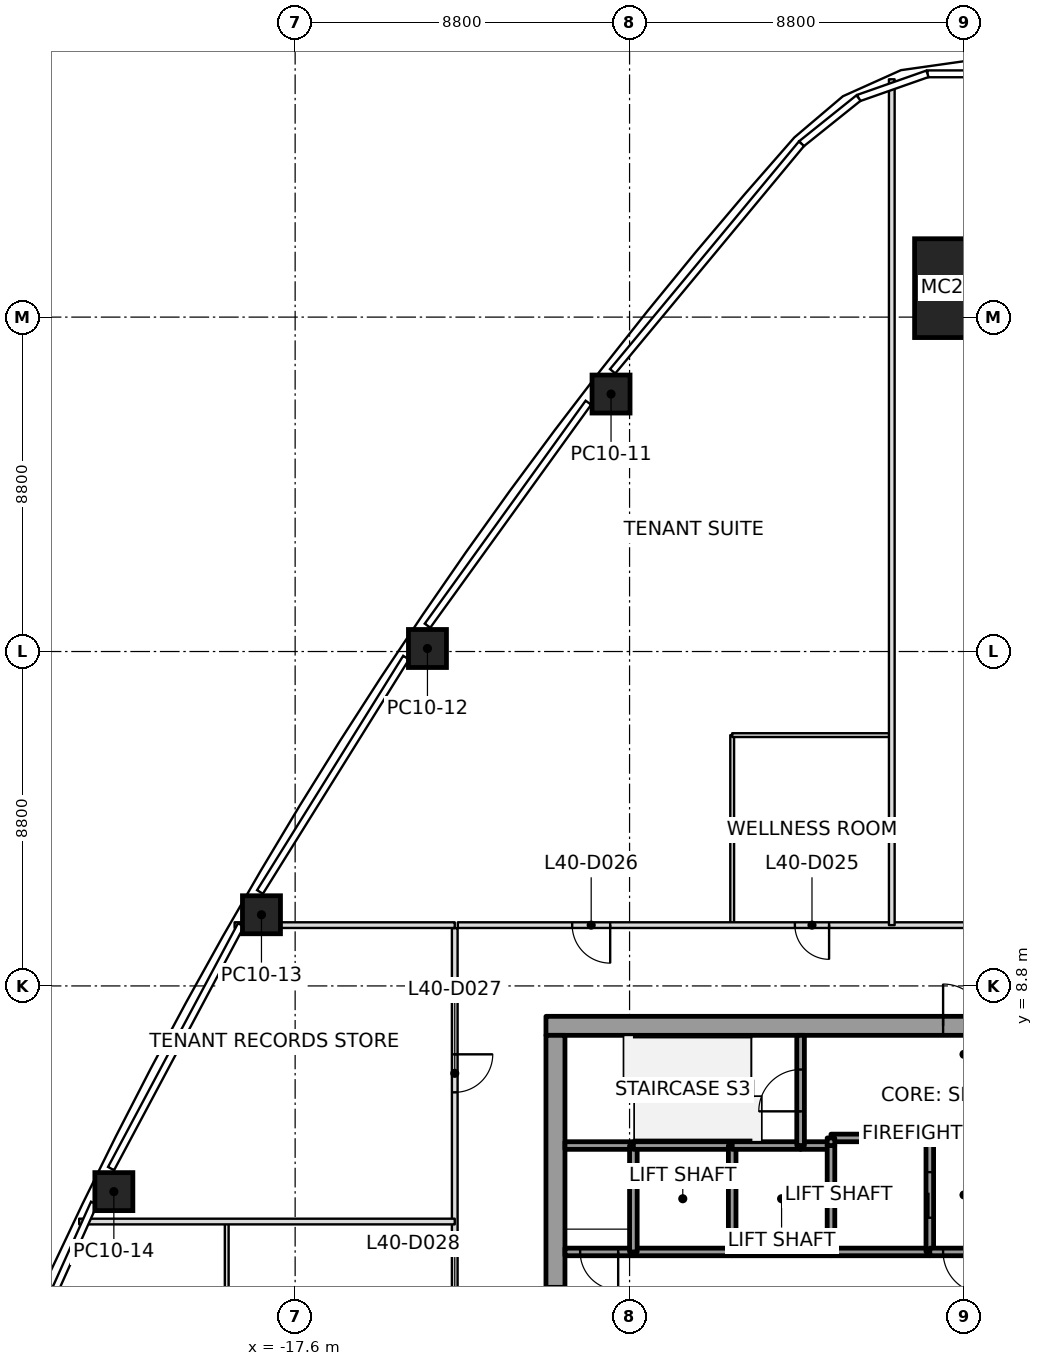
"""IFC4 building model, lengths in metres.
Left out: names, types, materials, properties, quantities, classifications, styles, units other than length and angle.
Written with IfcOpenShell. Run it as: python <this file> out.ifc"""

import sys

from ifc_helpers import new_model, si_unit, direction, frame, frame_2d, origin, origin_2d, place, context, subcontext, project, spatial, rectangle, extrude, element, fill, save


model = new_model("IFC4")
c1 = context("Model", 3, precision=1e-05, world=origin(), true_north=direction((0.0, 1.0)))
c2 = subcontext(c1, "Body", "Model", "MODEL_VIEW")
j1 = project(units=[si_unit("LENGTHUNIT", "METRE"), si_unit("PLANEANGLEUNIT", "RADIAN")], contexts=[c1])
p1 = place(None, origin())
s1 = spatial("IfcSite", under=j1, at=p1, CompositionType="ELEMENT")
p2 = place(p1, origin())
s2 = spatial("IfcBuilding", under=s1, at=p2, CompositionType="ELEMENT")
p3 = place(p2, frame((0.0, 0.0, 181.8)))
s3 = spatial("IfcBuildingStorey", under=s2, at=p3, CompositionType="ELEMENT", Elevation=181.8)
p4 = place(p3, frame((0.0, 27.162, 0.0), z_axis=(0.0, -0.032331720729, 0.999477193254), x_axis=(1.0, 0.0, 0.0)))
e1 = element("IfcColumn", 1, at=p4, inside=s3, PredefinedType="COLUMN", context=c2, shape_type="SweptSolid", body=[
    extrude(rectangle(XDim=2.6, YDim=2.6, at=origin_2d()), origin(), (0.0, 0.0, 1.0), 4.002),
])
p5 = place(p3, frame((-9.288, 24.375, 0.0), z_axis=(0.000244089295, -0.02050350076, 0.999789751336), x_axis=(0.612160679672, 0.790570217655, 0.016063412501)))
e2 = element("IfcColumn", 2, at=p5, inside=s3, PredefinedType="COLUMN", context=c2, shape_type="SweptSolid", body=[
    extrude(rectangle(XDim=1.0, YDim=1.0, at=origin_2d()), origin(), (0.0, 0.0, 1.0), 4.001),
])
p6 = place(p3, frame((-14.118, 17.68, 0.0), z_axis=(0.005248490815, -0.013243284963, 0.999898529226), x_axis=(0.55734623632, 0.83024095087, 0.00807070984)))
e3 = element("IfcColumn", 3, at=p6, inside=s3, PredefinedType="COLUMN", context=c2, shape_type="SweptSolid", body=[
    extrude(rectangle(XDim=1.0, YDim=1.0, at=origin_2d()), origin(), (0.0, 0.0, 1.0), 4.0),
])
p7 = place(p3, frame((-18.486, 10.673, 0.0), z_axis=(0.009887049298, -0.00573692984, 0.999934664812), x_axis=(0.499975560967, 0.866039512843, 2.5126546e-05)))
e4 = element("IfcColumn", 4, at=p7, inside=s3, PredefinedType="COLUMN", context=c2, shape_type="SweptSolid", body=[
    extrude(rectangle(XDim=1.0, YDim=1.0, at=origin_2d()), origin(), (0.0, 0.0, 1.0), 4.0),
])
p8 = place(p3, frame((-22.37, 3.387, 0.0), z_axis=(0.014097691364, 0.002013955909, 0.999898594398), x_axis=(0.440318544462, 0.897805834391, -0.008016429218)))
e5 = element("IfcColumn", 5, at=p8, inside=s3, PredefinedType="COLUMN", context=c2, shape_type="SweptSolid", body=[
    extrude(rectangle(XDim=1.0, YDim=1.0, at=origin_2d()), origin(), (0.0, 0.0, 1.0), 4.0),
])
p9 = place(p3, frame((-11.0, 7.75, 0.0), z_axis=(0.0, 0.0, 1.0), x_axis=(1.0, 0.0, 0.0)))
e6 = element("IfcWall", 6, at=p9, inside=s3, PredefinedType="SHEAR", context=c2, shape_type="SweptSolid", body=[
    extrude(rectangle(XDim=22.0, YDim=0.5, at=frame_2d((11.0, 0.0))), origin(), (0.0, 0.0, 1.0), 4.0),
])
p10 = place(p9, frame((10.45, 0.0, 0.0)))
e7 = element("IfcOpeningElement", 7, at=p10, cuts=e6, PredefinedType="OPENING", context=c2, shape_type="SweptSolid", body=[
    extrude(rectangle(XDim=1.1, YDim=2.1, at=frame_2d((0.55, 1.05))), frame((0.0, 0.25, 0.0), z_axis=(0.0, -1.0, 0.0), x_axis=(1.0, 0.0, 0.0)), (0.0, 0.0, 1.0), 0.5),
])
p11 = place(p3, frame((-10.75, -7.5, 0.0), z_axis=(0.0, 0.0, 1.0), x_axis=(0.0, 1.0, 0.0)))
e8 = element("IfcWall", 8, at=p11, inside=s3, PredefinedType="SHEAR", context=c2, shape_type="SweptSolid", body=[
    extrude(rectangle(XDim=15.0, YDim=0.5, at=frame_2d((7.5, 0.0))), origin(), (0.0, 0.0, 1.0), 4.0),
])
p12 = place(p11, frame((6.6, 0.0, 0.0)))
e9 = element("IfcOpeningElement", 9, at=p12, cuts=e8, PredefinedType="OPENING", context=c2, shape_type="SweptSolid", body=[
    extrude(rectangle(XDim=1.8, YDim=2.1, at=frame_2d((0.9, 1.05))), frame((0.0, 0.25, 0.0), z_axis=(0.0, -1.0, 0.0), x_axis=(1.0, 0.0, 0.0)), (0.0, 0.0, 1.0), 0.5),
])
p13 = place(p3, frame((-8.7, 1.8, 0.0), z_axis=(0.0, 0.0, 1.0), x_axis=(-1.0, 0.0, 0.0)))
e10 = element("IfcWall", 10, at=p13, inside=s3, PredefinedType="SOLIDWALL", context=c2, shape_type="SweptSolid", body=[
    extrude(rectangle(XDim=1.8, YDim=0.2, at=frame_2d((0.9, 0.0))), origin(), (0.0, 0.0, 1.0), 3.85),
])
p14 = place(p13, frame((0.4, 0.0, 0.0)))
e11 = element("IfcOpeningElement", 11, at=p14, cuts=e10, PredefinedType="OPENING", context=c2, shape_type="SweptSolid", body=[
    extrude(rectangle(XDim=1.0, YDim=2.1, at=frame_2d((0.5, 1.05))), frame((0.0, 0.1, 0.0), z_axis=(0.0, -1.0, 0.0), x_axis=(1.0, 0.0, 0.0)), (0.0, 0.0, 1.0), 0.2),
])
p15 = place(p3, frame((-8.7, 4.6, 0.0), z_axis=(0.0, 0.0, 1.0), x_axis=(-1.0, 0.0, 0.0)))
e12 = element("IfcWall", 12, at=p15, inside=s3, PredefinedType="SOLIDWALL", context=c2, shape_type="SweptSolid", body=[
    extrude(rectangle(XDim=1.8, YDim=0.2, at=frame_2d((0.9, 0.0))), origin(), (0.0, 0.0, 1.0), 3.85),
])
p16 = place(p3, frame((-6.1, 1.8, 0.0), z_axis=(0.0, 0.0, 1.0), x_axis=(-1.0, 0.0, 0.0)))
e13 = element("IfcWall", 13, at=p16, inside=s3, PredefinedType="SOLIDWALL", context=c2, shape_type="SweptSolid", body=[
    extrude(rectangle(XDim=2.6, YDim=0.2, at=frame_2d((1.3, 0.0))), origin(), (0.0, 0.0, 1.0), 3.85),
])
p17 = place(p3, frame((-8.7, 1.8, 0.0), z_axis=(0.0, 0.0, 1.0), x_axis=(0.0, 1.0, 0.0)))
e14 = element("IfcWall", 14, at=p17, inside=s3, PredefinedType="SOLIDWALL", context=c2, shape_type="SweptSolid", body=[
    extrude(rectangle(XDim=2.8, YDim=0.2, at=frame_2d((1.4, 0.0))), origin(), (0.0, 0.0, 1.0), 3.85),
])
p18 = place(p3, frame((-6.1, 4.6, 0.0), z_axis=(0.0, 0.0, 1.0), x_axis=(-1.0, 0.0, 0.0)))
e15 = element("IfcWall", 15, at=p18, inside=s3, PredefinedType="SOLIDWALL", context=c2, shape_type="SweptSolid", body=[
    extrude(rectangle(XDim=2.6, YDim=0.2, at=frame_2d((1.3, 0.0))), origin(), (0.0, 0.0, 1.0), 3.85),
])
p19 = place(p3, frame((-3.5, 1.8, 0.0), z_axis=(0.0, 0.0, 1.0), x_axis=(-1.0, 0.0, 0.0)))
e16 = element("IfcWall", 16, at=p19, inside=s3, PredefinedType="SOLIDWALL", context=c2, shape_type="SweptSolid", body=[
    extrude(rectangle(XDim=2.6, YDim=0.2, at=frame_2d((1.3, 0.0))), origin(), (0.0, 0.0, 1.0), 3.85),
])
p20 = place(p3, frame((-6.1, 1.8, 0.0), z_axis=(0.0, 0.0, 1.0), x_axis=(0.0, 1.0, 0.0)))
e17 = element("IfcWall", 17, at=p20, inside=s3, PredefinedType="SOLIDWALL", context=c2, shape_type="SweptSolid", body=[
    extrude(rectangle(XDim=2.8, YDim=0.2, at=frame_2d((1.4, 0.0))), origin(), (0.0, 0.0, 1.0), 3.85),
])
p21 = place(p3, frame((-4.3, 4.6, 0.0), z_axis=(0.0, 0.0, 1.0), x_axis=(-1.0, 0.0, 0.0)))
e18 = element("IfcWall", 18, at=p21, inside=s3, PredefinedType="SOLIDWALL", context=c2, shape_type="SweptSolid", body=[
    extrude(rectangle(XDim=1.8, YDim=0.2, at=frame_2d((0.9, 0.0))), origin(), (0.0, 0.0, 1.0), 3.85),
])
p22 = place(p3, frame((-3.5, 4.6, 0.0), z_axis=(0.0, 0.0, 1.0), x_axis=(-1.0, 0.0, 0.0)))
e19 = element("IfcWall", 19, at=p22, inside=s3, PredefinedType="SOLIDWALL", context=c2, shape_type="SweptSolid", body=[
    extrude(rectangle(XDim=0.8, YDim=0.2, at=frame_2d((0.4, 0.0))), origin(), (0.0, 0.0, 1.0), 3.85),
])
p23 = place(p3, frame((-4.3, 4.6, 0.0), z_axis=(0.0, 0.0, 1.0), x_axis=(0.0, 1.0, 0.0)))
e20 = element("IfcWall", 20, at=p23, inside=s3, PredefinedType="SOLIDWALL", context=c2, shape_type="SweptSolid", body=[
    extrude(rectangle(XDim=2.9, YDim=0.2, at=frame_2d((1.45, 0.0))), origin(), (0.0, 0.0, 1.0), 3.85),
])
p24 = place(p23, frame((0.9, 0.0, 0.0)))
e21 = element("IfcOpeningElement", 21, at=p24, cuts=e20, PredefinedType="OPENING", context=c2, shape_type="SweptSolid", body=[
    extrude(rectangle(XDim=1.1, YDim=2.1, at=frame_2d((0.55, 1.05))), frame((0.0, 0.1, 0.0), z_axis=(0.0, -1.0, 0.0), x_axis=(1.0, 0.0, 0.0)), (0.0, 0.0, 1.0), 0.2),
])
p25 = place(p3, frame((-0.9, 1.8, 0.0), z_axis=(0.0, 0.0, 1.0), x_axis=(-1.0, 0.0, 0.0)))
e22 = element("IfcWall", 22, at=p25, inside=s3, PredefinedType="SOLIDWALL", context=c2, shape_type="SweptSolid", body=[
    extrude(rectangle(XDim=2.6, YDim=0.2, at=frame_2d((1.3, 0.0))), origin(), (0.0, 0.0, 1.0), 3.85),
])
p26 = place(p3, frame((-3.5, 4.6, 0.0), z_axis=(0.0, 0.0, 1.0), x_axis=(0.0, -1.0, 0.0)))
e23 = element("IfcWall", 23, at=p26, inside=s3, PredefinedType="SOLIDWALL", context=c2, shape_type="SweptSolid", body=[
    extrude(rectangle(XDim=2.8, YDim=0.2, at=frame_2d((1.4, 0.0))), origin(), (0.0, 0.0, 1.0), 3.85),
])
p27 = place(p3, frame((-0.9, 1.8, 0.0), z_axis=(0.0, 0.0, 1.0), x_axis=(0.0, 1.0, 0.0)))
e24 = element("IfcWall", 24, at=p27, inside=s3, PredefinedType="SOLIDWALL", context=c2, shape_type="SweptSolid", body=[
    extrude(rectangle(XDim=3.0, YDim=0.2, at=frame_2d((1.5, 0.0))), origin(), (0.0, 0.0, 1.0), 3.85),
])
p28 = place(p27, frame((0.9, 0.0, 0.0)))
e25 = element("IfcOpeningElement", 25, at=p28, cuts=e24, PredefinedType="OPENING", context=c2, shape_type="SweptSolid", body=[
    extrude(rectangle(XDim=1.2, YDim=2.1, at=frame_2d((0.6, 1.05))), frame((0.0, 0.1, 0.0), z_axis=(0.0, -1.0, 0.0), x_axis=(1.0, 0.0, 0.0)), (0.0, 0.0, 1.0), 0.2),
])
p29 = place(p3, frame((-0.9, 4.8, 0.0), z_axis=(0.0, 0.0, 1.0), x_axis=(-1.0, 0.0, 0.0)))
e26 = element("IfcWall", 26, at=p29, inside=s3, PredefinedType="SOLIDWALL", context=c2, shape_type="SweptSolid", body=[
    extrude(rectangle(XDim=2.6, YDim=0.2, at=frame_2d((1.3, 0.0))), origin(), (0.0, 0.0, 1.0), 3.85),
])
p30 = place(p3, frame((-3.5, 4.8, 0.0), z_axis=(0.0, 0.0, 1.0), x_axis=(0.0, -1.0, 0.0)))
e27 = element("IfcWall", 27, at=p30, inside=s3, PredefinedType="SOLIDWALL", context=c2, shape_type="SweptSolid", body=[
    extrude(rectangle(XDim=0.2, YDim=0.2, at=frame_2d((0.1, 0.0))), origin(), (0.0, 0.0, 1.0), 3.85),
])
p31 = place(p3, frame((0.9, 1.8, 0.0), z_axis=(0.0, 0.0, 1.0), x_axis=(-1.0, 0.0, 0.0)))
e28 = element("IfcWall", 28, at=p31, inside=s3, PredefinedType="SOLIDWALL", context=c2, shape_type="SweptSolid", body=[
    extrude(rectangle(XDim=1.8, YDim=0.2, at=frame_2d((0.9, 0.0))), origin(), (0.0, 0.0, 1.0), 3.85),
])
p32 = place(p31, frame((0.35, 0.0, 0.0)))
e29 = element("IfcOpeningElement", 29, at=p32, cuts=e28, PredefinedType="OPENING", context=c2, shape_type="SweptSolid", body=[
    extrude(rectangle(XDim=1.1, YDim=2.1, at=frame_2d((0.55, 1.05))), frame((0.0, 0.1, 0.0), z_axis=(0.0, -1.0, 0.0), x_axis=(1.0, 0.0, 0.0)), (0.0, 0.0, 1.0), 0.2),
])
p33 = place(p3, frame((-13.4, 2.6, 0.0), z_axis=(0.0, 0.0, 1.0), x_axis=(-1.0, 0.0, 0.0)))
e30 = element("IfcWall", 30, at=p33, inside=s3, PredefinedType="PARTITIONING", context=c2, shape_type="SweptSolid", body=[
    extrude(rectangle(XDim=9.882, YDim=0.15, at=frame_2d((4.941, 0.0))), origin(), (0.0, 0.0, 1.0), 3.234),
])
p34 = place(p3, frame((-13.4, 10.4, 0.0), z_axis=(0.0, 0.0, 1.0), x_axis=(-1.0, 0.0, 0.0)))
e31 = element("IfcWall", 31, at=p34, inside=s3, PredefinedType="PARTITIONING", context=c2, shape_type="SweptSolid", body=[
    extrude(rectangle(XDim=5.793, YDim=0.15, at=frame_2d((2.896, 0.0))), origin(), (0.0, 0.0, 1.0), 3.45),
])
p35 = place(p3, frame((-1.9, 10.4, 0.0), z_axis=(0.0, 0.0, 1.0), x_axis=(0.0, 1.0, 0.0)))
e32 = element("IfcWall", 32, at=p35, inside=s3, PredefinedType="PARTITIONING", context=c2, shape_type="SweptSolid", body=[
    extrude(rectangle(XDim=22.259, YDim=0.15, at=frame_2d((11.129, 0.0))), origin(), (0.0, 0.0, 1.0), 3.234),
])
p36 = place(p3, frame((-13.4, 10.32, 0.0), z_axis=(0.0, 0.0, 1.0), x_axis=(0.0, -1.0, 0.0)))
e33 = element("IfcWall", 33, at=p36, inside=s3, PredefinedType="PARTITIONING", context=c2, shape_type="SweptSolid", body=[
    extrude(rectangle(XDim=20.64, YDim=0.15, at=frame_2d((10.32, 0.0))), origin(), (0.0, 0.0, 1.0), 3.166),
])
p37 = place(p36, frame((3.32, 0.0, 0.0)))
e34 = element("IfcOpeningElement", 34, at=p37, cuts=e33, PredefinedType="OPENING", context=c2, shape_type="SweptSolid", body=[
    extrude(rectangle(XDim=1.0, YDim=2.1, at=frame_2d((0.5, 1.05))), frame((0.0, 0.075, 0.0), z_axis=(0.0, -1.0, 0.0), x_axis=(1.0, 0.0, 0.0)), (0.0, 0.0, 1.0), 0.15),
])
p38 = place(p36, frame((9.77, 0.0, 0.0)))
e35 = element("IfcOpeningElement", 35, at=p38, cuts=e33, PredefinedType="OPENING", context=c2, shape_type="SweptSolid", body=[
    extrude(rectangle(XDim=0.9, YDim=2.1, at=frame_2d((0.45, 1.05))), frame((0.0, 0.075, 0.0), z_axis=(0.0, -1.0, 0.0), x_axis=(1.0, 0.0, 0.0)), (0.0, 0.0, 1.0), 0.15),
])
p39 = place(p36, frame((16.28, 0.0, 0.0)))
e36 = element("IfcOpeningElement", 36, at=p39, cuts=e33, PredefinedType="OPENING", context=c2, shape_type="SweptSolid", body=[
    extrude(rectangle(XDim=1.0, YDim=2.1, at=frame_2d((0.5, 1.05))), frame((0.0, 0.075, 0.0), z_axis=(0.0, -1.0, 0.0), x_axis=(1.0, 0.0, 0.0)), (0.0, 0.0, 1.0), 0.15),
])
p40 = place(p3, frame((13.32, 10.4, 0.0), z_axis=(0.0, 0.0, 1.0), x_axis=(-1.0, 0.0, 0.0)))
e37 = element("IfcWall", 37, at=p40, inside=s3, PredefinedType="PARTITIONING", context=c2, shape_type="SweptSolid", body=[
    extrude(rectangle(XDim=26.64, YDim=0.15, at=frame_2d((13.32, 0.0))), origin(), (0.0, 0.0, 1.0), 3.166),
])
p41 = place(p40, frame((1.95, 0.0, 0.0)))
e38 = element("IfcOpeningElement", 38, at=p41, cuts=e37, PredefinedType="OPENING", context=c2, shape_type="SweptSolid", body=[
    extrude(rectangle(XDim=0.9, YDim=2.1, at=frame_2d((0.45, 1.05))), frame((0.0, 0.075, 0.0), z_axis=(0.0, -1.0, 0.0), x_axis=(1.0, 0.0, 0.0)), (0.0, 0.0, 1.0), 0.15),
])
p42 = place(p40, frame((9.61, 0.0, 0.0)))
e39 = element("IfcOpeningElement", 39, at=p42, cuts=e37, PredefinedType="OPENING", context=c2, shape_type="SweptSolid", body=[
    extrude(rectangle(XDim=1.0, YDim=2.1, at=frame_2d((0.5, 1.05))), frame((0.0, 0.075, 0.0), z_axis=(0.0, -1.0, 0.0), x_axis=(1.0, 0.0, 0.0)), (0.0, 0.0, 1.0), 0.15),
])
p43 = place(p40, frame((16.87, 0.0, 0.0)))
e40 = element("IfcOpeningElement", 40, at=p43, cuts=e37, PredefinedType="OPENING", context=c2, shape_type="SweptSolid", body=[
    extrude(rectangle(XDim=0.9, YDim=2.1, at=frame_2d((0.45, 1.05))), frame((0.0, 0.075, 0.0), z_axis=(0.0, -1.0, 0.0), x_axis=(1.0, 0.0, 0.0)), (0.0, 0.0, 1.0), 0.15),
])
p44 = place(p40, frame((22.63, 0.0, 0.0)))
e41 = element("IfcOpeningElement", 41, at=p44, cuts=e37, PredefinedType="OPENING", context=c2, shape_type="SweptSolid", body=[
    extrude(rectangle(XDim=1.0, YDim=2.1, at=frame_2d((0.5, 1.05))), frame((0.0, 0.075, 0.0), z_axis=(0.0, -1.0, 0.0), x_axis=(1.0, 0.0, 0.0)), (0.0, 0.0, 1.0), 0.15),
])
p45 = place(p3, frame((-19.4, -2.4, 0.0), z_axis=(0.0, 0.0, 1.0), x_axis=(0.0, 1.0, 0.0)))
e42 = element("IfcWall", 42, at=p45, inside=s3, PredefinedType="PARTITIONING", context=c2, shape_type="SweptSolid", body=[
    extrude(rectangle(XDim=4.97, YDim=0.1, at=frame_2d((2.485, 0.0))), origin(), (0.0, 0.0, 1.0), 3.317),
])
p46 = place(p3, frame((-6.1, 10.43, 0.0), z_axis=(0.0, 0.0, 1.0), x_axis=(0.0, 1.0, 0.0)))
e43 = element("IfcWall", 43, at=p46, inside=s3, PredefinedType="PARTITIONING", context=c2, shape_type="SweptSolid", body=[
    extrude(rectangle(XDim=4.97, YDim=0.1, at=frame_2d((2.485, 0.0))), origin(), (0.0, 0.0, 1.0), 3.247),
])
p47 = place(p3, frame((-6.1, 15.4, 0.0), z_axis=(0.0, 0.0, 1.0), x_axis=(1.0, 0.0, 0.0)))
e44 = element("IfcWall", 44, at=p47, inside=s3, PredefinedType="PARTITIONING", context=c2, shape_type="SweptSolid", body=[
    extrude(rectangle(XDim=4.17, YDim=0.1, at=frame_2d((2.085, 0.0))), origin(), (0.0, 0.0, 1.0), 3.45),
])
p48 = place(p43, origin())
e45 = element("IfcDoor", 45, at=p48, inside=s3, OperationType="SINGLE_SWING_RIGHT", PredefinedType="DOOR", context=c2, shape_type="SweptSolid", body=[
    extrude(rectangle(XDim=0.9, YDim=2.1, at=frame_2d((0.45, 1.05))), frame((0.0, 0.025, 0.0), z_axis=(0.0, -1.0, 0.0), x_axis=(1.0, 0.0, 0.0)), (0.0, 0.0, 1.0), 0.05),
])
fill(e40, e45)
p49 = place(p44, origin())
e46 = element("IfcDoor", 46, at=p49, inside=s3, OperationType="SINGLE_SWING_RIGHT", PredefinedType="DOOR", context=c2, shape_type="SweptSolid", body=[
    extrude(rectangle(XDim=1.0, YDim=2.1, at=frame_2d((0.5, 1.05))), frame((0.0, 0.025, 0.0), z_axis=(0.0, -1.0, 0.0), x_axis=(1.0, 0.0, 0.0)), (0.0, 0.0, 1.0), 0.05),
])
fill(e41, e46)
p50 = place(p37, origin())
e47 = element("IfcDoor", 47, at=p50, inside=s3, OperationType="SINGLE_SWING_LEFT", PredefinedType="DOOR", context=c2, shape_type="SweptSolid", body=[
    extrude(rectangle(XDim=1.0, YDim=2.1, at=frame_2d((0.5, 1.05))), frame((0.0, 0.025, 0.0), z_axis=(0.0, -1.0, 0.0), x_axis=(1.0, 0.0, 0.0)), (0.0, 0.0, 1.0), 0.05),
])
fill(e34, e47)
p51 = place(p28, origin())
e48 = element("IfcDoor", 48, at=p51, inside=s3, OperationType="SLIDING_TO_RIGHT", PredefinedType="DOOR", context=c2, shape_type="SweptSolid", body=[
    extrude(rectangle(XDim=1.2, YDim=2.1, at=frame_2d((0.6, 1.05))), frame((0.0, 0.025, 0.0), z_axis=(0.0, -1.0, 0.0), x_axis=(1.0, 0.0, 0.0)), (0.0, 0.0, 1.0), 0.05),
])
fill(e25, e48)
p52 = place(p32, origin())
e49 = element("IfcDoor", 49, at=p52, inside=s3, OperationType="SINGLE_SWING_LEFT", PredefinedType="DOOR", context=c2, shape_type="SweptSolid", body=[
    extrude(rectangle(XDim=1.1, YDim=2.1, at=frame_2d((0.55, 1.05))), frame((0.0, 0.025, 0.0), z_axis=(0.0, -1.0, 0.0), x_axis=(1.0, 0.0, 0.0)), (0.0, 0.0, 1.0), 0.05),
])
fill(e29, e49)
p53 = place(p14, origin())
e50 = element("IfcDoor", 50, at=p53, inside=s3, OperationType="SINGLE_SWING_RIGHT", PredefinedType="DOOR", context=c2, shape_type="SweptSolid", body=[
    extrude(rectangle(XDim=1.0, YDim=2.1, at=frame_2d((0.5, 1.05))), frame((0.0, 0.025, 0.0), z_axis=(0.0, -1.0, 0.0), x_axis=(1.0, 0.0, 0.0)), (0.0, 0.0, 1.0), 0.05),
])
fill(e11, e50)
p54 = place(p24, origin())
e51 = element("IfcDoor", 51, at=p54, inside=s3, OperationType="SINGLE_SWING_LEFT", PredefinedType="DOOR", context=c2, shape_type="SweptSolid", body=[
    extrude(rectangle(XDim=1.1, YDim=2.1, at=frame_2d((0.55, 1.05))), frame((0.0, 0.025, 0.0), z_axis=(0.0, -1.0, 0.0), x_axis=(1.0, 0.0, 0.0)), (0.0, 0.0, 1.0), 0.05),
])
fill(e21, e51)
p55 = place(p12, origin())
e52 = element("IfcDoor", 52, at=p55, inside=s3, OperationType="DOUBLE_DOOR_SINGLE_SWING", PredefinedType="DOOR", context=c2, shape_type="SweptSolid", body=[
    extrude(rectangle(XDim=1.8, YDim=2.1, at=frame_2d((0.9, 1.05))), frame((0.0, 0.025, 0.0), z_axis=(0.0, -1.0, 0.0), x_axis=(1.0, 0.0, 0.0)), (0.0, 0.0, 1.0), 0.05),
])
fill(e9, e52)
p56 = place(p10, origin())
e53 = element("IfcDoor", 53, at=p56, inside=s3, OperationType="SINGLE_SWING_RIGHT", PredefinedType="DOOR", context=c2, shape_type="SweptSolid", body=[
    extrude(rectangle(XDim=1.1, YDim=2.1, at=frame_2d((0.55, 1.05))), frame((0.0, 0.025, 0.0), z_axis=(0.0, -1.0, 0.0), x_axis=(1.0, 0.0, 0.0)), (0.0, 0.0, 1.0), 0.05),
])
fill(e7, e53)
save(model, sys.argv[1])
